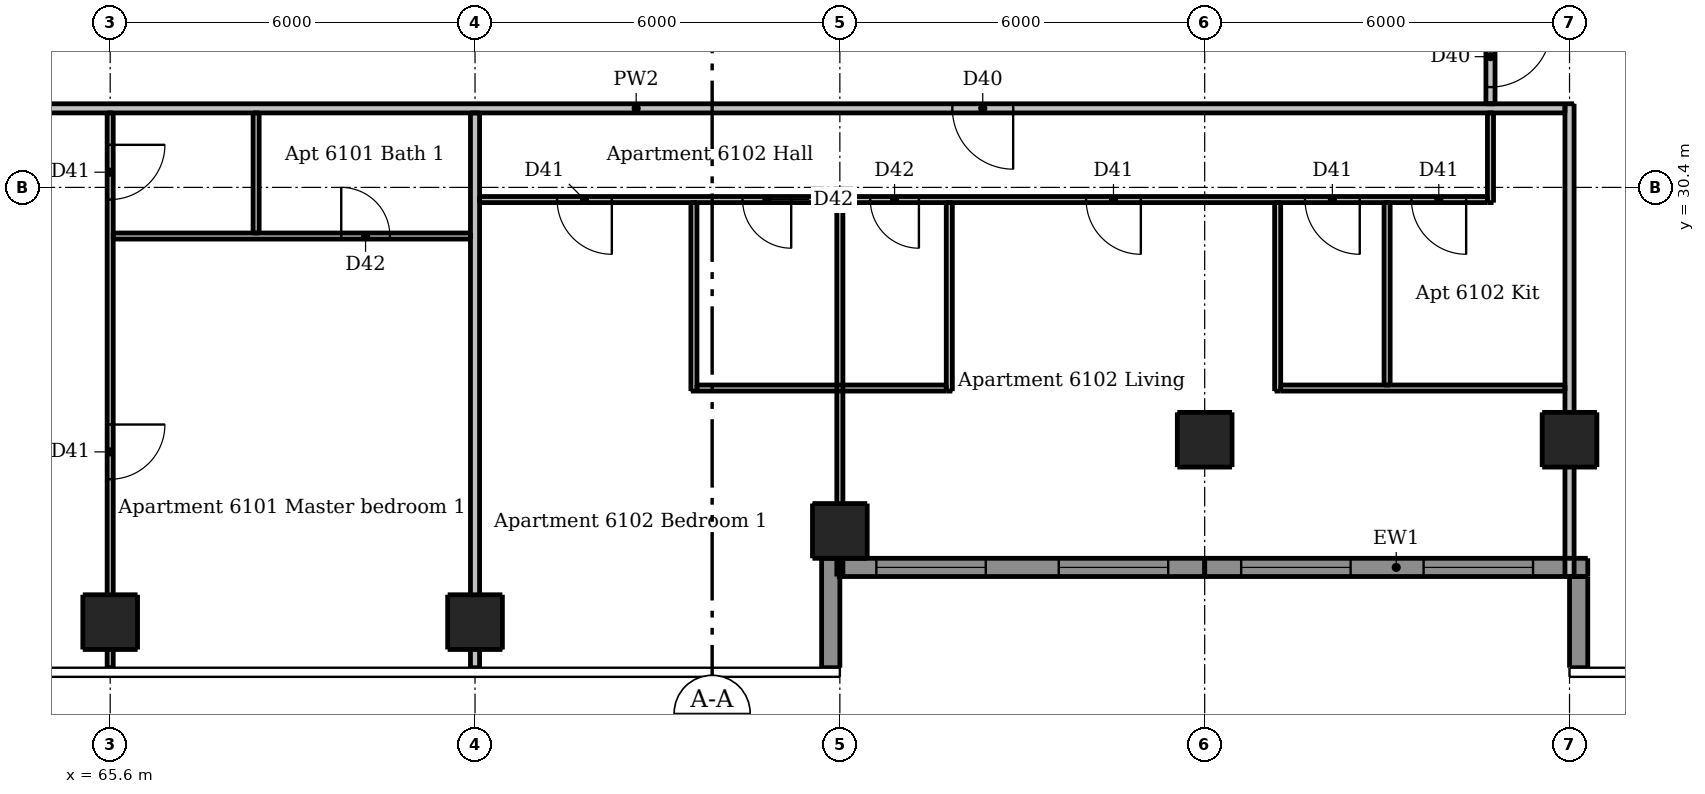
"""IFC4 building model, lengths in metres.
Left out: names, types, materials, properties, quantities, classifications, styles, units other than length and angle.
Written with IfcOpenShell. Run it as: python <this file> out.ifc"""

import sys

from ifc_helpers import new_model, si_unit, direction, frame, frame_2d, origin, origin_2d, place, context, subcontext, project, spatial, rectangle, extrude, element, fill, save


model = new_model("IFC4")
c1 = context("Model", 3, precision=1e-05, world=origin(), true_north=direction((0.0, 1.0)))
c2 = subcontext(c1, "Body", "Model", "MODEL_VIEW")
j1 = project(units=[si_unit("LENGTHUNIT", "METRE"), si_unit("PLANEANGLEUNIT", "RADIAN")], contexts=[c1])
p1 = place(None, origin())
s1 = spatial("IfcSite", under=j1, at=p1, CompositionType="ELEMENT")
p2 = place(p1, origin())
s2 = spatial("IfcBuilding", under=s1, at=p2, CompositionType="ELEMENT")
p3 = place(p2, frame((0.0, 0.0, 226.6)))
s3 = spatial("IfcBuildingStorey", under=s2, at=p3, CompositionType="ELEMENT", Elevation=226.6)
for number, where, z_axis, x_axis in (
    (1, (65.6, 23.25, 0.0), (0.0, 0.0, 1.0), (1.0, 0.0, 0.0)),
    (2, (71.6, 23.25, 0.0), (0.0, 0.0, 1.0), (1.0, 0.0, 0.0)),
    (3, (77.6, 24.75, 0.0), (0.0, 0.0, 1.0), (1.0, 0.0, 0.0)),
    (4, (83.6, 26.25, 0.0), (0.0, 0.0, 1.0), (1.0, 0.0, 0.0)),
    (5, (89.6, 26.25, 0.0), (0.0, 0.0, 1.0), (1.0, 0.0, 0.0)),
):
    element("IfcColumn", number, at=place(p3, frame(where, z_axis=z_axis, x_axis=x_axis)), inside=s3, PredefinedType="COLUMN", context=c2, shape_type="SweptSolid", body=[
        extrude(rectangle(XDim=0.9, YDim=0.9, at=origin_2d()), origin(), (0.0, 0.0, 1.0), 2.95),
    ])
p4 = place(p3, frame((77.45, 22.5, 0.0), z_axis=(0.0, 0.0, 1.0), x_axis=(0.0, 1.0, 0.0)))
e6 = element("IfcWall", 6, at=p4, inside=s3, PredefinedType="SOLIDWALL", context=c2, shape_type="SweptSolid", body=[
    extrude(rectangle(XDim=1.8, YDim=0.3, at=frame_2d((0.9, 0.0))), origin(), (0.0, 0.0, 1.0), 2.95),
])
p5 = place(p3, frame((89.75, 24.0, 0.0), z_axis=(0.0, 0.0, 1.0), x_axis=(0.0, -1.0, 0.0)))
e7 = element("IfcWall", 7, at=p5, inside=s3, PredefinedType="SOLIDWALL", context=c2, shape_type="SweptSolid", body=[
    extrude(rectangle(XDim=1.5, YDim=0.3, at=frame_2d((0.75, 0.0))), origin(), (0.0, 0.0, 1.0), 2.95),
])
p6 = place(p3, frame((77.6, 24.15, 0.0), z_axis=(0.0, 0.0, 1.0), x_axis=(1.0, 0.0, 0.0)))
e8 = element("IfcWall", 8, at=p6, inside=s3, PredefinedType="SOLIDWALL", context=c2, shape_type="SweptSolid", body=[
    extrude(rectangle(XDim=6.0, YDim=0.3, at=frame_2d((3.0, 0.0))), origin(), (0.0, 0.0, 1.0), 2.34),
])
p7 = place(p6, frame((0.6, 0.0, 0.15)))
e9 = element("IfcOpeningElement", 9, at=p7, cuts=e8, PredefinedType="OPENING", context=c2, shape_type="SweptSolid", body=[
    extrude(rectangle(XDim=1.8, YDim=2.1, at=frame_2d((0.9, 1.05))), frame((0.0, 0.16, 0.0), z_axis=(0.0, -1.0, 0.0), x_axis=(1.0, 0.0, 0.0)), (0.0, 0.0, 1.0), 0.32),
])
p8 = place(p6, frame((3.6, 0.0, 0.15)))
e10 = element("IfcOpeningElement", 10, at=p8, cuts=e8, PredefinedType="OPENING", context=c2, shape_type="SweptSolid", body=[
    extrude(rectangle(XDim=1.8, YDim=2.1, at=frame_2d((0.9, 1.05))), frame((0.0, 0.16, 0.0), z_axis=(0.0, -1.0, 0.0), x_axis=(1.0, 0.0, 0.0)), (0.0, 0.0, 1.0), 0.32),
])
p9 = place(p3, frame((83.6, 24.15, 0.0), z_axis=(0.0, 0.0, 1.0), x_axis=(1.0, 0.0, 0.0)))
e11 = element("IfcWall", 11, at=p9, inside=s3, PredefinedType="SOLIDWALL", context=c2, shape_type="SweptSolid", body=[
    extrude(rectangle(XDim=6.3, YDim=0.3, at=frame_2d((3.15, 0.0))), origin(), (0.0, 0.0, 1.0), 2.34),
])
p10 = place(p9, frame((0.6, 0.0, 0.15)))
e12 = element("IfcOpeningElement", 12, at=p10, cuts=e11, PredefinedType="OPENING", context=c2, shape_type="SweptSolid", body=[
    extrude(rectangle(XDim=1.8, YDim=2.1, at=frame_2d((0.9, 1.05))), frame((0.0, 0.16, 0.0), z_axis=(0.0, -1.0, 0.0), x_axis=(1.0, 0.0, 0.0)), (0.0, 0.0, 1.0), 0.32),
])
p11 = place(p9, frame((3.6, 0.0, 0.15)))
e13 = element("IfcOpeningElement", 13, at=p11, cuts=e11, PredefinedType="OPENING", context=c2, shape_type="SweptSolid", body=[
    extrude(rectangle(XDim=1.8, YDim=2.1, at=frame_2d((0.9, 1.05))), frame((0.0, 0.16, 0.0), z_axis=(0.0, -1.0, 0.0), x_axis=(1.0, 0.0, 0.0)), (0.0, 0.0, 1.0), 0.32),
])
p12 = place(p3, frame((65.6, 31.625, 0.0), z_axis=(0.0, 0.0, 1.0), x_axis=(0.0, -1.0, 0.0)))
e14 = element("IfcWall", 14, at=p12, inside=s3, PredefinedType="PARTITIONING", context=c2, shape_type="SweptSolid", body=[
    extrude(rectangle(XDim=9.125, YDim=0.1, at=frame_2d((4.562, 0.0))), origin(), (0.0, 0.0, 1.0), 2.332),
])
p13 = place(p12, frame((0.525, 0.0, 0.0)))
e15 = element("IfcOpeningElement", 15, at=p13, cuts=e14, PredefinedType="OPENING", context=c2, shape_type="SweptSolid", body=[
    extrude(rectangle(XDim=0.9, YDim=2.1, at=frame_2d((0.45, 1.05))), frame((0.0, 0.06, 0.0), z_axis=(0.0, -1.0, 0.0), x_axis=(1.0, 0.0, 0.0)), (0.0, 0.0, 1.0), 0.12),
])
p14 = place(p12, frame((5.125, 0.0, 0.0)))
e16 = element("IfcOpeningElement", 16, at=p14, cuts=e14, PredefinedType="OPENING", context=c2, shape_type="SweptSolid", body=[
    extrude(rectangle(XDim=0.9, YDim=2.1, at=frame_2d((0.45, 1.05))), frame((0.0, 0.06, 0.0), z_axis=(0.0, -1.0, 0.0), x_axis=(1.0, 0.0, 0.0)), (0.0, 0.0, 1.0), 0.12),
])
p15 = place(p3, frame((68.0, 29.65, 0.0), z_axis=(0.0, 0.0, 1.0), x_axis=(0.0, 1.0, 0.0)))
e17 = element("IfcWall", 17, at=p15, inside=s3, PredefinedType="PARTITIONING", context=c2, shape_type="SweptSolid", body=[
    extrude(rectangle(XDim=1.975, YDim=0.1, at=frame_2d((0.988, 0.0))), origin(), (0.0, 0.0, 1.0), 2.95),
])
p16 = place(p3, frame((75.2, 27.05, 0.0), z_axis=(0.0, 0.0, 1.0), x_axis=(0.0, 1.0, 0.0)))
e18 = element("IfcWall", 18, at=p16, inside=s3, PredefinedType="PARTITIONING", context=c2, shape_type="SweptSolid", body=[
    extrude(rectangle(XDim=3.1, YDim=0.1, at=frame_2d((1.55, 0.0))), origin(), (0.0, 0.0, 1.0), 2.95),
])
p17 = place(p3, frame((77.6, 24.0, 0.0), z_axis=(0.0, 0.0, 1.0), x_axis=(0.0, 1.0, 0.0)))
e19 = element("IfcWall", 19, at=p17, inside=s3, PredefinedType="PARTITIONING", context=c2, shape_type="SweptSolid", body=[
    extrude(rectangle(XDim=6.15, YDim=0.1, at=frame_2d((3.075, 0.0))), origin(), (0.0, 0.0, 1.0), 2.332),
])
for number, where, z_axis, x_axis in (
    (20, (79.4, 27.05, 0.0), (0.0, 0.0, 1.0), (0.0, 1.0, 0.0)),
    (21, (84.8, 27.05, 0.0), (0.0, 0.0, 1.0), (0.0, 1.0, 0.0)),
):
    element("IfcWall", number, at=place(p3, frame(where, z_axis=z_axis, x_axis=x_axis)), inside=s3, PredefinedType="PARTITIONING", context=c2, shape_type="SweptSolid", body=[
        extrude(rectangle(XDim=3.1, YDim=0.1, at=frame_2d((1.55, 0.0))), origin(), (0.0, 0.0, 1.0), 2.95),
    ])
p18 = place(p3, frame((86.6, 27.15, 0.0), z_axis=(0.0, 0.0, 1.0), x_axis=(0.0, 1.0, 0.0)))
e22 = element("IfcWall", 22, at=p18, inside=s3, PredefinedType="PARTITIONING", context=c2, shape_type="SweptSolid", body=[
    extrude(rectangle(XDim=3.0, YDim=0.1, at=frame_2d((1.5, 0.0))), origin(), (0.0, 0.0, 1.0), 2.95),
])
p19 = place(p3, frame((88.3, 30.15, 0.0), z_axis=(0.0, 0.0, 1.0), x_axis=(0.0, 1.0, 0.0)))
e23 = element("IfcWall", 23, at=p19, inside=s3, PredefinedType="PARTITIONING", context=c2, shape_type="SweptSolid", body=[
    extrude(rectangle(XDim=1.475, YDim=0.1, at=frame_2d((0.738, 0.0))), origin(), (0.0, 0.0, 1.0), 2.95),
])
p20 = place(p3, frame((88.25, 30.2, 0.0), z_axis=(0.0, 0.0, 1.0), x_axis=(-1.0, 0.0, 0.0)))
e24 = element("IfcWall", 24, at=p20, inside=s3, PredefinedType="PARTITIONING", context=c2, shape_type="SweptSolid", body=[
    extrude(rectangle(XDim=16.575, YDim=0.1, at=frame_2d((8.288, 0.0))), origin(), (0.0, 0.0, 1.0), 2.95),
])
p21 = place(p20, frame((5.7, 0.0, 0.0)))
e25 = element("IfcOpeningElement", 25, at=p21, cuts=e24, PredefinedType="OPENING", context=c2, shape_type="SweptSolid", body=[
    extrude(rectangle(XDim=0.9, YDim=2.1, at=frame_2d((0.45, 1.05))), frame((0.0, 0.06, 0.0), z_axis=(0.0, -1.0, 0.0), x_axis=(1.0, 0.0, 0.0)), (0.0, 0.0, 1.0), 0.12),
])
p22 = place(p20, frame((0.35, 0.0, 0.0)))
e26 = element("IfcOpeningElement", 26, at=p22, cuts=e24, PredefinedType="OPENING", context=c2, shape_type="SweptSolid", body=[
    extrude(rectangle(XDim=0.9, YDim=2.1, at=frame_2d((0.45, 1.05))), frame((0.0, 0.06, 0.0), z_axis=(0.0, -1.0, 0.0), x_axis=(1.0, 0.0, 0.0)), (0.0, 0.0, 1.0), 0.12),
])
p23 = place(p20, frame((2.1, 0.0, 0.0)))
e27 = element("IfcOpeningElement", 27, at=p23, cuts=e24, PredefinedType="OPENING", context=c2, shape_type="SweptSolid", body=[
    extrude(rectangle(XDim=0.9, YDim=2.1, at=frame_2d((0.45, 1.05))), frame((0.0, 0.06, 0.0), z_axis=(0.0, -1.0, 0.0), x_axis=(1.0, 0.0, 0.0)), (0.0, 0.0, 1.0), 0.12),
])
p24 = place(p20, frame((9.35, 0.0, 0.0)))
e28 = element("IfcOpeningElement", 28, at=p24, cuts=e24, PredefinedType="OPENING", context=c2, shape_type="SweptSolid", body=[
    extrude(rectangle(XDim=0.8, YDim=2.1, at=frame_2d((0.4, 1.05))), frame((0.0, 0.06, 0.0), z_axis=(0.0, -1.0, 0.0), x_axis=(1.0, 0.0, 0.0)), (0.0, 0.0, 1.0), 0.12),
])
p25 = place(p20, frame((14.4, 0.0, 0.0)))
e29 = element("IfcOpeningElement", 29, at=p25, cuts=e24, PredefinedType="OPENING", context=c2, shape_type="SweptSolid", body=[
    extrude(rectangle(XDim=0.9, YDim=2.1, at=frame_2d((0.45, 1.05))), frame((0.0, 0.06, 0.0), z_axis=(0.0, -1.0, 0.0), x_axis=(1.0, 0.0, 0.0)), (0.0, 0.0, 1.0), 0.12),
])
p26 = place(p20, frame((11.45, 0.0, 0.0)))
e30 = element("IfcOpeningElement", 30, at=p26, cuts=e24, PredefinedType="OPENING", context=c2, shape_type="SweptSolid", body=[
    extrude(rectangle(XDim=0.8, YDim=2.1, at=frame_2d((0.4, 1.05))), frame((0.0, 0.06, 0.0), z_axis=(0.0, -1.0, 0.0), x_axis=(1.0, 0.0, 0.0)), (0.0, 0.0, 1.0), 0.12),
])
p27 = place(p3, frame((65.65, 29.6, 0.0), z_axis=(0.0, 0.0, 1.0), x_axis=(1.0, 0.0, 0.0)))
e31 = element("IfcWall", 31, at=p27, inside=s3, PredefinedType="PARTITIONING", context=c2, shape_type="SweptSolid", body=[
    extrude(rectangle(XDim=5.875, YDim=0.1, at=frame_2d((2.938, 0.0))), origin(), (0.0, 0.0, 1.0), 2.95),
])
p28 = place(p27, frame((3.75, 0.0, 0.0)))
e32 = element("IfcOpeningElement", 32, at=p28, cuts=e31, PredefinedType="OPENING", context=c2, shape_type="SweptSolid", body=[
    extrude(rectangle(XDim=0.8, YDim=2.1, at=frame_2d((0.4, 1.05))), frame((0.0, 0.06, 0.0), z_axis=(0.0, -1.0, 0.0), x_axis=(1.0, 0.0, 0.0)), (0.0, 0.0, 1.0), 0.12),
])
p29 = place(p3, frame((75.25, 27.1, 0.0), z_axis=(0.0, 0.0, 1.0), x_axis=(1.0, 0.0, 0.0)))
e33 = element("IfcWall", 33, at=p29, inside=s3, PredefinedType="PARTITIONING", context=c2, shape_type="SweptSolid", body=[
    extrude(rectangle(XDim=4.1, YDim=0.1, at=frame_2d((2.05, 0.0))), origin(), (0.0, 0.0, 1.0), 2.95),
])
p30 = place(p3, frame((84.85, 27.1, 0.0), z_axis=(0.0, 0.0, 1.0), x_axis=(1.0, 0.0, 0.0)))
e34 = element("IfcWall", 34, at=p30, inside=s3, PredefinedType="PARTITIONING", context=c2, shape_type="SweptSolid", body=[
    extrude(rectangle(XDim=4.675, YDim=0.1, at=frame_2d((2.337, 0.0))), origin(), (0.0, 0.0, 1.0), 2.95),
])
p31 = place(p3, frame((71.6, 22.5, 0.0), z_axis=(0.0, 0.0, 1.0), x_axis=(0.0, 1.0, 0.0)))
e35 = element("IfcWall", 35, at=p31, inside=s3, PredefinedType="PARTITIONING", context=c2, shape_type="SweptSolid", body=[
    extrude(rectangle(XDim=9.125, YDim=0.15, at=frame_2d((4.562, 0.0))), origin(), (0.0, 0.0, 1.0), 2.332),
])
p32 = place(p3, frame((88.3, 61.175, 0.0), z_axis=(0.0, 0.0, 1.0), x_axis=(0.0, -1.0, 0.0)))
e36 = element("IfcWall", 36, at=p32, inside=s3, PredefinedType="PARTITIONING", context=c2, shape_type="SweptSolid", body=[
    extrude(rectangle(XDim=29.4, YDim=0.15, at=frame_2d((14.7, 0.0))), origin(), (0.0, 0.0, 1.0), 2.95),
])
p33 = place(p32, frame((28.125, 0.0, 0.0)))
e37 = element("IfcOpeningElement", 37, at=p33, cuts=e36, PredefinedType="OPENING", context=c2, shape_type="SweptSolid", body=[
    extrude(rectangle(XDim=1.0, YDim=2.1, at=frame_2d((0.5, 1.05))), frame((0.0, 0.085, 0.0), z_axis=(0.0, -1.0, 0.0), x_axis=(1.0, 0.0, 0.0)), (0.0, 0.0, 1.0), 0.17),
])
p34 = place(p32, frame((10.775, 0.0, 0.0)))
e38 = element("IfcOpeningElement", 38, at=p34, cuts=e36, PredefinedType="OPENING", context=c2, shape_type="SweptSolid", body=[
    extrude(rectangle(XDim=1.0, YDim=2.1, at=frame_2d((0.5, 1.05))), frame((0.0, 0.085, 0.0), z_axis=(0.0, -1.0, 0.0), x_axis=(1.0, 0.0, 0.0)), (0.0, 0.0, 1.0), 0.17),
])
p35 = place(p3, frame((89.6, 24.0, 0.0), z_axis=(0.0, 0.0, 1.0), x_axis=(0.0, 1.0, 0.0)))
e39 = element("IfcWall", 39, at=p35, inside=s3, PredefinedType="PARTITIONING", context=c2, shape_type="SweptSolid", body=[
    extrude(rectangle(XDim=7.775, YDim=0.15, at=frame_2d((3.887, 0.0))), origin(), (0.0, 0.0, 1.0), 2.332),
])
p36 = place(p3, frame((89.525, 31.7, 0.0), z_axis=(0.0, 0.0, 1.0), x_axis=(-1.0, 0.0, 0.0)))
e40 = element("IfcWall", 40, at=p36, inside=s3, PredefinedType="PARTITIONING", context=c2, shape_type="SweptSolid", body=[
    extrude(rectangle(XDim=30.55, YDim=0.15, at=frame_2d((15.275, 0.0))), origin(), (0.0, 0.0, 1.0), 2.95),
])
p37 = place(p36, frame((26.775, 0.0, 0.0)))
e41 = element("IfcOpeningElement", 41, at=p37, cuts=e40, PredefinedType="OPENING", context=c2, shape_type="SweptSolid", body=[
    extrude(rectangle(XDim=1.0, YDim=2.1, at=frame_2d((0.5, 1.05))), frame((0.0, 0.085, 0.0), z_axis=(0.0, -1.0, 0.0), x_axis=(1.0, 0.0, 0.0)), (0.0, 0.0, 1.0), 0.17),
])
p38 = place(p36, frame((9.075, 0.0, 0.0)))
e42 = element("IfcOpeningElement", 42, at=p38, cuts=e40, PredefinedType="OPENING", context=c2, shape_type="SweptSolid", body=[
    extrude(rectangle(XDim=1.0, YDim=2.1, at=frame_2d((0.5, 1.05))), frame((0.0, 0.085, 0.0), z_axis=(0.0, -1.0, 0.0), x_axis=(1.0, 0.0, 0.0)), (0.0, 0.0, 1.0), 0.17),
])
p39 = place(p7, origin())
e43 = element("IfcWindow", 43, at=p39, inside=s3, PartitioningType="DOUBLE_PANEL_VERTICAL", PredefinedType="WINDOW", context=c2, shape_type="SweptSolid", body=[
    extrude(rectangle(XDim=1.8, YDim=2.1, at=frame_2d((0.9, 1.05))), frame((0.0, 0.03, 0.0), z_axis=(0.0, -1.0, 0.0), x_axis=(1.0, 0.0, 0.0)), (0.0, 0.0, 1.0), 0.06),
])
fill(e9, e43)
p40 = place(p8, origin())
e44 = element("IfcWindow", 44, at=p40, inside=s3, PartitioningType="DOUBLE_PANEL_VERTICAL", PredefinedType="WINDOW", context=c2, shape_type="SweptSolid", body=[
    extrude(rectangle(XDim=1.8, YDim=2.1, at=frame_2d((0.9, 1.05))), frame((0.0, 0.03, 0.0), z_axis=(0.0, -1.0, 0.0), x_axis=(1.0, 0.0, 0.0)), (0.0, 0.0, 1.0), 0.06),
])
fill(e10, e44)
p41 = place(p10, origin())
e45 = element("IfcWindow", 45, at=p41, inside=s3, PartitioningType="DOUBLE_PANEL_VERTICAL", PredefinedType="WINDOW", context=c2, shape_type="SweptSolid", body=[
    extrude(rectangle(XDim=1.8, YDim=2.1, at=frame_2d((0.9, 1.05))), frame((0.0, 0.03, 0.0), z_axis=(0.0, -1.0, 0.0), x_axis=(1.0, 0.0, 0.0)), (0.0, 0.0, 1.0), 0.06),
])
fill(e12, e45)
p42 = place(p11, origin())
e46 = element("IfcWindow", 46, at=p42, inside=s3, PartitioningType="DOUBLE_PANEL_VERTICAL", PredefinedType="WINDOW", context=c2, shape_type="SweptSolid", body=[
    extrude(rectangle(XDim=1.8, YDim=2.1, at=frame_2d((0.9, 1.05))), frame((0.0, 0.03, 0.0), z_axis=(0.0, -1.0, 0.0), x_axis=(1.0, 0.0, 0.0)), (0.0, 0.0, 1.0), 0.06),
])
fill(e13, e46)
p43 = place(p13, origin())
e47 = element("IfcDoor", 47, at=p43, inside=s3, OperationType="SINGLE_SWING_LEFT", PredefinedType="DOOR", context=c2, shape_type="SweptSolid", body=[
    extrude(rectangle(XDim=0.9, YDim=2.1, at=frame_2d((0.45, 1.05))), frame((0.0, 0.025, 0.0), z_axis=(0.0, -1.0, 0.0), x_axis=(1.0, 0.0, 0.0)), (0.0, 0.0, 1.0), 0.05),
])
fill(e15, e47)
p44 = place(p14, origin())
e48 = element("IfcDoor", 48, at=p44, inside=s3, OperationType="SINGLE_SWING_LEFT", PredefinedType="DOOR", context=c2, shape_type="SweptSolid", body=[
    extrude(rectangle(XDim=0.9, YDim=2.1, at=frame_2d((0.45, 1.05))), frame((0.0, 0.025, 0.0), z_axis=(0.0, -1.0, 0.0), x_axis=(1.0, 0.0, 0.0)), (0.0, 0.0, 1.0), 0.05),
])
fill(e16, e48)
p45 = place(p28, origin())
e49 = element("IfcDoor", 49, at=p45, inside=s3, OperationType="SINGLE_SWING_LEFT", PredefinedType="DOOR", context=c2, shape_type="SweptSolid", body=[
    extrude(rectangle(XDim=0.8, YDim=2.1, at=frame_2d((0.4, 1.05))), frame((0.0, 0.025, 0.0), z_axis=(0.0, -1.0, 0.0), x_axis=(1.0, 0.0, 0.0)), (0.0, 0.0, 1.0), 0.05),
])
fill(e32, e49)
p46 = place(p38, origin())
e50 = element("IfcDoor", 50, at=p46, inside=s3, OperationType="SINGLE_SWING_LEFT", PredefinedType="DOOR", context=c2, shape_type="SweptSolid", body=[
    extrude(rectangle(XDim=1.0, YDim=2.1, at=frame_2d((0.5, 1.05))), frame((0.0, 0.025, 0.0), z_axis=(0.0, -1.0, 0.0), x_axis=(1.0, 0.0, 0.0)), (0.0, 0.0, 1.0), 0.05),
])
fill(e42, e50)
p47 = place(p21, origin())
e51 = element("IfcDoor", 51, at=p47, inside=s3, OperationType="SINGLE_SWING_LEFT", PredefinedType="DOOR", context=c2, shape_type="SweptSolid", body=[
    extrude(rectangle(XDim=0.9, YDim=2.1, at=frame_2d((0.45, 1.05))), frame((0.0, 0.025, 0.0), z_axis=(0.0, -1.0, 0.0), x_axis=(1.0, 0.0, 0.0)), (0.0, 0.0, 1.0), 0.05),
])
fill(e25, e51)
p48 = place(p22, origin())
e52 = element("IfcDoor", 52, at=p48, inside=s3, OperationType="SINGLE_SWING_LEFT", PredefinedType="DOOR", context=c2, shape_type="SweptSolid", body=[
    extrude(rectangle(XDim=0.9, YDim=2.1, at=frame_2d((0.45, 1.05))), frame((0.0, 0.025, 0.0), z_axis=(0.0, -1.0, 0.0), x_axis=(1.0, 0.0, 0.0)), (0.0, 0.0, 1.0), 0.05),
])
fill(e26, e52)
p49 = place(p23, origin())
e53 = element("IfcDoor", 53, at=p49, inside=s3, OperationType="SINGLE_SWING_LEFT", PredefinedType="DOOR", context=c2, shape_type="SweptSolid", body=[
    extrude(rectangle(XDim=0.9, YDim=2.1, at=frame_2d((0.45, 1.05))), frame((0.0, 0.025, 0.0), z_axis=(0.0, -1.0, 0.0), x_axis=(1.0, 0.0, 0.0)), (0.0, 0.0, 1.0), 0.05),
])
fill(e27, e53)
p50 = place(p24, origin())
e54 = element("IfcDoor", 54, at=p50, inside=s3, OperationType="SINGLE_SWING_LEFT", PredefinedType="DOOR", context=c2, shape_type="SweptSolid", body=[
    extrude(rectangle(XDim=0.8, YDim=2.1, at=frame_2d((0.4, 1.05))), frame((0.0, 0.025, 0.0), z_axis=(0.0, -1.0, 0.0), x_axis=(1.0, 0.0, 0.0)), (0.0, 0.0, 1.0), 0.05),
])
fill(e28, e54)
p51 = place(p25, origin())
e55 = element("IfcDoor", 55, at=p51, inside=s3, OperationType="SINGLE_SWING_LEFT", PredefinedType="DOOR", context=c2, shape_type="SweptSolid", body=[
    extrude(rectangle(XDim=0.9, YDim=2.1, at=frame_2d((0.45, 1.05))), frame((0.0, 0.025, 0.0), z_axis=(0.0, -1.0, 0.0), x_axis=(1.0, 0.0, 0.0)), (0.0, 0.0, 1.0), 0.05),
])
fill(e29, e55)
p52 = place(p26, origin())
e56 = element("IfcDoor", 56, at=p52, inside=s3, OperationType="SINGLE_SWING_LEFT", PredefinedType="DOOR", context=c2, shape_type="SweptSolid", body=[
    extrude(rectangle(XDim=0.8, YDim=2.1, at=frame_2d((0.4, 1.05))), frame((0.0, 0.025, 0.0), z_axis=(0.0, -1.0, 0.0), x_axis=(1.0, 0.0, 0.0)), (0.0, 0.0, 1.0), 0.05),
])
fill(e30, e56)
p53 = place(p33, origin())
e57 = element("IfcDoor", 57, at=p53, inside=s3, OperationType="SINGLE_SWING_LEFT", PredefinedType="DOOR", context=c2, shape_type="SweptSolid", body=[
    extrude(rectangle(XDim=1.0, YDim=2.1, at=frame_2d((0.5, 1.05))), frame((0.0, 0.025, 0.0), z_axis=(0.0, -1.0, 0.0), x_axis=(1.0, 0.0, 0.0)), (0.0, 0.0, 1.0), 0.05),
])
fill(e37, e57)
save(model, sys.argv[1])
